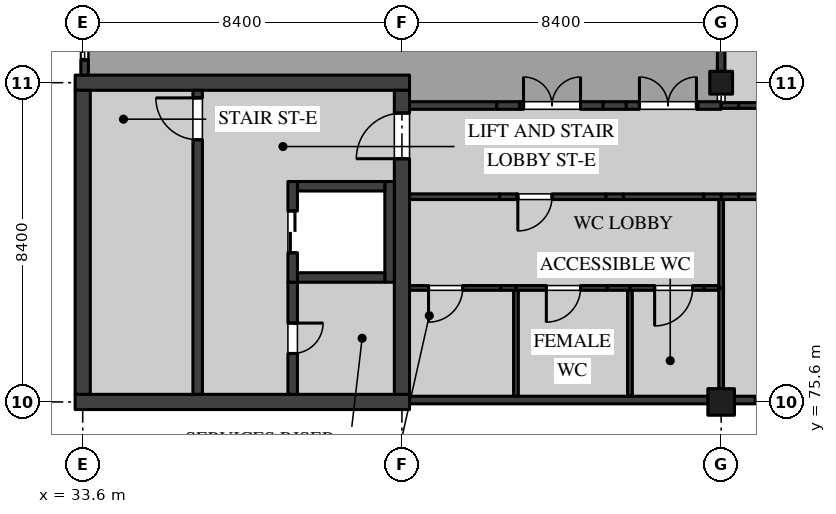
"""IFC4 building model, lengths in metres.
Left out: names, types, materials, properties, quantities, classifications, styles, units other than length and angle.
Written with IfcOpenShell. Run it as: python <this file> out.ifc"""

import sys

from ifc_helpers import new_model, si_unit, direction, frame, frame_2d, origin, origin_2d, place, context, subcontext, project, spatial, rectangle, extrude, element, fill, save


model = new_model("IFC4")
c1 = context("Model", 3, precision=1e-05, world=origin(), true_north=direction((0.0, 1.0)))
c2 = subcontext(c1, "Body", "Model", "MODEL_VIEW")
j1 = project(units=[si_unit("LENGTHUNIT", "METRE"), si_unit("PLANEANGLEUNIT", "RADIAN")], contexts=[c1])
p1 = place(None, origin())
s1 = spatial("IfcSite", under=j1, at=p1, CompositionType="ELEMENT")
p2 = place(p1, origin())
s2 = spatial("IfcBuilding", under=s1, at=p2, CompositionType="ELEMENT")
p3 = place(p2, frame((0.0, 0.0, 5.4)))
s3 = spatial("IfcBuildingStorey", under=s2, at=p3, CompositionType="ELEMENT", Elevation=5.4)
p4 = place(p3, frame((50.4, 75.6, 0.0), z_axis=(0.0, 0.0, 1.0), x_axis=(1.0, 0.0, 0.0)))
e1 = element("IfcColumn", 1, at=p4, inside=s3, PredefinedType="COLUMN", context=c2, shape_type="SweptSolid", body=[
    extrude(rectangle(XDim=0.7, YDim=0.7, at=origin_2d()), origin(), (0.0, 0.0, 1.0), 4.37),
])
p5 = place(p3, frame((50.4, 84.0, 0.0), z_axis=(0.0, 0.0, 1.0), x_axis=(1.0, 0.0, 0.0)))
e2 = element("IfcColumn", 2, at=p5, inside=s3, PredefinedType="COLUMN", context=c2, shape_type="SweptSolid", body=[
    extrude(rectangle(XDim=0.6, YDim=0.6, at=origin_2d()), origin(), (0.0, 0.0, 1.0), 4.37),
])
for number, where, z_axis, x_axis in (
    (3, (33.4, 75.6, 0.0), (0.0, 0.0, 1.0), (1.0, 0.0, 0.0)),
    (4, (33.4, 84.0, 0.0), (0.0, 0.0, 1.0), (1.0, 0.0, 0.0)),
):
    element("IfcWall", number, at=place(p3, frame(where, z_axis=z_axis, x_axis=x_axis)), inside=s3, PredefinedType="SHEAR", context=c2, shape_type="SweptSolid", body=[
        extrude(rectangle(XDim=8.8, YDim=0.4, at=frame_2d((4.4, 0.0))), origin(), (0.0, 0.0, 1.0), 4.37),
    ])
p6 = place(p3, frame((33.6, 75.8, 0.0), z_axis=(0.0, 0.0, 1.0), x_axis=(0.0, 1.0, 0.0)))
e5 = element("IfcWall", 5, at=p6, inside=s3, PredefinedType="SHEAR", context=c2, shape_type="SweptSolid", body=[
    extrude(rectangle(XDim=8.0, YDim=0.4, at=frame_2d((4.0, 0.0))), origin(), (0.0, 0.0, 1.0), 4.37),
])
p7 = place(p3, frame((42.0, 75.8, 0.0), z_axis=(0.0, 0.0, 1.0), x_axis=(0.0, 1.0, 0.0)))
e6 = element("IfcWall", 6, at=p7, inside=s3, PredefinedType="SHEAR", context=c2, shape_type="SweptSolid", body=[
    extrude(rectangle(XDim=8.0, YDim=0.4, at=frame_2d((4.0, 0.0))), origin(), (0.0, 0.0, 1.0), 4.37),
])
p8 = place(p7, frame((6.2, 0.0, 0.0)))
e7 = element("IfcOpeningElement", 7, at=p8, cuts=e6, PredefinedType="OPENING", context=c2, shape_type="SweptSolid", body=[
    extrude(rectangle(XDim=1.2, YDim=2.1, at=frame_2d((0.6, 1.05))), frame((0.0, 0.21, 0.0), z_axis=(0.0, -1.0, 0.0), x_axis=(1.0, 0.0, 0.0)), (0.0, 0.0, 1.0), 0.42),
])
p9 = place(p3, frame((36.625, 83.8, 0.0), z_axis=(0.0, 0.0, 1.0), x_axis=(0.0, -1.0, 0.0)))
e8 = element("IfcWall", 8, at=p9, inside=s3, PredefinedType="SOLIDWALL", context=c2, shape_type="SweptSolid", body=[
    extrude(rectangle(XDim=8.0, YDim=0.25, at=frame_2d((4.0, 0.0))), origin(), (0.0, 0.0, 1.0), 4.37),
])
p10 = place(p9, frame((0.2, 0.0, 0.0)))
e9 = element("IfcOpeningElement", 9, at=p10, cuts=e8, PredefinedType="OPENING", context=c2, shape_type="SweptSolid", body=[
    extrude(rectangle(XDim=1.1, YDim=2.1, at=frame_2d((0.55, 1.05))), frame((0.0, 0.135, 0.0), z_axis=(0.0, -1.0, 0.0), x_axis=(1.0, 0.0, 0.0)), (0.0, 0.0, 1.0), 0.27),
])
p11 = place(p3, frame((39.125, 78.75, 0.0), z_axis=(0.0, 0.0, 1.0), x_axis=(0.0, -1.0, 0.0)))
e10 = element("IfcWall", 10, at=p11, inside=s3, PredefinedType="SOLIDWALL", context=c2, shape_type="SweptSolid", body=[
    extrude(rectangle(XDim=2.95, YDim=0.25, at=frame_2d((1.475, 0.0))), origin(), (0.0, 0.0, 1.0), 4.37),
])
p12 = place(p11, frame((1.075, 0.0, 0.0)))
e11 = element("IfcOpeningElement", 11, at=p12, cuts=e10, PredefinedType="OPENING", context=c2, shape_type="SweptSolid", body=[
    extrude(rectangle(XDim=0.8, YDim=2.1, at=frame_2d((0.4, 1.05))), frame((0.0, 0.135, 0.0), z_axis=(0.0, -1.0, 0.0), x_axis=(1.0, 0.0, 0.0)), (0.0, 0.0, 1.0), 0.27),
])
p13 = place(p3, frame((41.675, 78.75, 0.0), z_axis=(0.0, 0.0, 1.0), x_axis=(0.0, 1.0, 0.0)))
e12 = element("IfcWall", 12, at=p13, inside=s3, PredefinedType="SOLIDWALL", context=c2, shape_type="SweptSolid", body=[
    extrude(rectangle(XDim=2.65, YDim=0.25, at=frame_2d((1.325, 0.0))), origin(), (0.0, 0.0, 1.0), 4.37),
])
for number, where, z_axis, x_axis in (
    (13, (39.25, 81.275, 0.0), (0.0, 0.0, 1.0), (1.0, 0.0, 0.0)),
    (14, (39.25, 78.875, 0.0), (0.0, 0.0, 1.0), (1.0, 0.0, 0.0)),
):
    element("IfcWall", number, at=place(p3, frame(where, z_axis=z_axis, x_axis=x_axis)), inside=s3, PredefinedType="SOLIDWALL", context=c2, shape_type="SweptSolid", body=[
        extrude(rectangle(XDim=2.3, YDim=0.25, at=frame_2d((1.15, 0.0))), origin(), (0.0, 0.0, 1.0), 4.37),
    ])
p14 = place(p3, frame((39.125, 78.75, 0.0), z_axis=(0.0, 0.0, 1.0), x_axis=(0.0, 1.0, 0.0)))
e15 = element("IfcWall", 15, at=p14, inside=s3, PredefinedType="SOLIDWALL", context=c2, shape_type="SweptSolid", body=[
    extrude(rectangle(XDim=2.65, YDim=0.25, at=frame_2d((1.325, 0.0))), origin(), (0.0, 0.0, 1.0), 4.37),
])
p15 = place(p14, frame((0.775, 0.0, 0.0)))
e16 = element("IfcOpeningElement", 16, at=p15, cuts=e15, PredefinedType="OPENING", context=c2, shape_type="SweptSolid", body=[
    extrude(rectangle(XDim=1.1, YDim=2.1, at=frame_2d((0.55, 1.05))), frame((0.0, 0.135, 0.0), z_axis=(0.0, -1.0, 0.0), x_axis=(1.0, 0.0, 0.0)), (0.0, 0.0, 1.0), 0.27),
])
p16 = place(p3, frame((42.2, 83.4, 0.0), z_axis=(0.0, 0.0, 1.0), x_axis=(1.0, 0.0, 0.0)))
e17 = element("IfcWall", 17, at=p16, inside=s3, PredefinedType="PARTITIONING", context=c2, shape_type="SweptSolid", body=[
    extrude(rectangle(XDim=2.295, YDim=0.2, at=frame_2d((1.147, 0.0))), origin(), (0.0, 0.0, 1.0), 4.37),
])
p17 = place(p3, frame((44.495, 83.4, 0.0), z_axis=(0.0, 0.0, 1.0), x_axis=(1.0, 0.0, 0.0)))
e18 = element("IfcWall", 18, at=p17, inside=s3, PredefinedType="PARTITIONING", context=c2, shape_type="SweptSolid", body=[
    extrude(rectangle(XDim=0.61, YDim=0.2, at=frame_2d((0.305, 0.0))), origin(), (0.0, 0.0, 1.0), 3.895),
])
p18 = place(p3, frame((45.105, 83.4, 0.0), z_axis=(0.0, 0.0, 1.0), x_axis=(1.0, 0.0, 0.0)))
e19 = element("IfcWall", 19, at=p18, inside=s3, PredefinedType="PARTITIONING", context=c2, shape_type="SweptSolid", body=[
    extrude(rectangle(XDim=2.19, YDim=0.2, at=frame_2d((1.095, 0.0))), origin(), (0.0, 0.0, 1.0), 4.37),
])
p19 = place(p18, frame((0.095, 0.0, 0.0)))
e20 = element("IfcOpeningElement", 20, at=p19, cuts=e19, PredefinedType="OPENING", context=c2, shape_type="SweptSolid", body=[
    extrude(rectangle(XDim=1.5, YDim=2.1, at=frame_2d((0.75, 1.05))), frame((0.0, 0.11, 0.0), z_axis=(0.0, -1.0, 0.0), x_axis=(1.0, 0.0, 0.0)), (0.0, 0.0, 1.0), 0.22),
])
p20 = place(p3, frame((47.295, 83.4, 0.0), z_axis=(0.0, 0.0, 1.0), x_axis=(1.0, 0.0, 0.0)))
e21 = element("IfcWall", 21, at=p20, inside=s3, PredefinedType="PARTITIONING", context=c2, shape_type="SweptSolid", body=[
    extrude(rectangle(XDim=0.61, YDim=0.2, at=frame_2d((0.305, 0.0))), origin(), (0.0, 0.0, 1.0), 3.895),
])
p21 = place(p3, frame((47.905, 83.4, 0.0), z_axis=(0.0, 0.0, 1.0), x_axis=(1.0, 0.0, 0.0)))
e22 = element("IfcWall", 22, at=p21, inside=s3, PredefinedType="PARTITIONING", context=c2, shape_type="SweptSolid", body=[
    extrude(rectangle(XDim=1.885, YDim=0.2, at=frame_2d((0.942, 0.0))), origin(), (0.0, 0.0, 1.0), 4.37),
])
p22 = place(p21, frame((0.345, 0.0, 0.0)))
e23 = element("IfcOpeningElement", 23, at=p22, cuts=e22, PredefinedType="OPENING", context=c2, shape_type="SweptSolid", body=[
    extrude(rectangle(XDim=1.5, YDim=2.1, at=frame_2d((0.75, 1.05))), frame((0.0, 0.11, 0.0), z_axis=(0.0, -1.0, 0.0), x_axis=(1.0, 0.0, 0.0)), (0.0, 0.0, 1.0), 0.22),
])
p23 = place(p3, frame((49.79, 83.4, 0.0), z_axis=(0.0, 0.0, 1.0), x_axis=(1.0, 0.0, 0.0)))
e24 = element("IfcWall", 24, at=p23, inside=s3, PredefinedType="PARTITIONING", context=c2, shape_type="SweptSolid", body=[
    extrude(rectangle(XDim=0.61, YDim=0.2, at=frame_2d((0.305, 0.0))), origin(), (0.0, 0.0, 1.0), 3.746),
])
p24 = place(p3, frame((50.4, 81.0, 0.0), z_axis=(0.0, 0.0, 1.0), x_axis=(1.0, 0.0, 0.0)))
e25 = element("IfcWall", 25, at=p24, inside=s3, PredefinedType="PARTITIONING", context=c2, shape_type="SweptSolid", body=[
    extrude(rectangle(XDim=0.46, YDim=0.15, at=frame_2d((0.23, 0.0))), origin(), (0.0, 0.0, 1.0), 3.746),
])
p25 = place(p3, frame((50.86, 81.0, 0.0), z_axis=(0.0, 0.0, 1.0), x_axis=(1.0, 0.0, 0.0)))
e26 = element("IfcWall", 26, at=p25, inside=s3, PredefinedType="PARTITIONING", context=c2, shape_type="SweptSolid", body=[
    extrude(rectangle(XDim=2.11, YDim=0.15, at=frame_2d((1.055, 0.0))), origin(), (0.0, 0.0, 1.0), 4.37),
])
p26 = place(p3, frame((50.4, 83.4, 0.0), z_axis=(0.0, 0.0, 1.0), x_axis=(1.0, 0.0, 0.0)))
e27 = element("IfcWall", 27, at=p26, inside=s3, PredefinedType="PARTITIONING", context=c2, shape_type="SweptSolid", body=[
    extrude(rectangle(XDim=0.46, YDim=0.15, at=frame_2d((0.23, 0.0))), origin(), (0.0, 0.0, 1.0), 3.746),
])
p27 = place(p3, frame((50.86, 83.4, 0.0), z_axis=(0.0, 0.0, 1.0), x_axis=(1.0, 0.0, 0.0)))
e28 = element("IfcWall", 28, at=p27, inside=s3, PredefinedType="PARTITIONING", context=c2, shape_type="SweptSolid", body=[
    extrude(rectangle(XDim=2.11, YDim=0.15, at=frame_2d((1.055, 0.0))), origin(), (0.0, 0.0, 1.0), 4.37),
])
p28 = place(p3, frame((42.2, 81.0, 0.0), z_axis=(0.0, 0.0, 1.0), x_axis=(1.0, 0.0, 0.0)))
e29 = element("IfcWall", 29, at=p28, inside=s3, PredefinedType="PARTITIONING", context=c2, shape_type="SweptSolid", body=[
    extrude(rectangle(XDim=2.37, YDim=0.15, at=frame_2d((1.185, 0.0))), origin(), (0.0, 0.0, 1.0), 4.37),
])
p29 = place(p3, frame((44.57, 81.0, 0.0), z_axis=(0.0, 0.0, 1.0), x_axis=(1.0, 0.0, 0.0)))
e30 = element("IfcWall", 30, at=p29, inside=s3, PredefinedType="PARTITIONING", context=c2, shape_type="SweptSolid", body=[
    extrude(rectangle(XDim=0.46, YDim=0.15, at=frame_2d((0.23, 0.0))), origin(), (0.0, 0.0, 1.0), 3.895),
])
p30 = place(p3, frame((45.03, 81.0, 0.0), z_axis=(0.0, 0.0, 1.0), x_axis=(1.0, 0.0, 0.0)))
e31 = element("IfcWall", 31, at=p30, inside=s3, PredefinedType="PARTITIONING", context=c2, shape_type="SweptSolid", body=[
    extrude(rectangle(XDim=2.34, YDim=0.15, at=frame_2d((1.17, 0.0))), origin(), (0.0, 0.0, 1.0), 4.37),
])
p31 = place(p30, frame((0.02, 0.0, 0.0)))
e32 = element("IfcOpeningElement", 32, at=p31, cuts=e31, PredefinedType="OPENING", context=c2, shape_type="SweptSolid", body=[
    extrude(rectangle(XDim=0.9, YDim=2.1, at=frame_2d((0.45, 1.05))), frame((0.0, 0.085, 0.0), z_axis=(0.0, -1.0, 0.0), x_axis=(1.0, 0.0, 0.0)), (0.0, 0.0, 1.0), 0.17),
])
p32 = place(p3, frame((47.37, 81.0, 0.0), z_axis=(0.0, 0.0, 1.0), x_axis=(1.0, 0.0, 0.0)))
e33 = element("IfcWall", 33, at=p32, inside=s3, PredefinedType="PARTITIONING", context=c2, shape_type="SweptSolid", body=[
    extrude(rectangle(XDim=0.46, YDim=0.15, at=frame_2d((0.23, 0.0))), origin(), (0.0, 0.0, 1.0), 3.895),
])
p33 = place(p3, frame((47.83, 81.0, 0.0), z_axis=(0.0, 0.0, 1.0), x_axis=(1.0, 0.0, 0.0)))
e34 = element("IfcWall", 34, at=p33, inside=s3, PredefinedType="PARTITIONING", context=c2, shape_type="SweptSolid", body=[
    extrude(rectangle(XDim=2.11, YDim=0.15, at=frame_2d((1.055, 0.0))), origin(), (0.0, 0.0, 1.0), 4.37),
])
p34 = place(p3, frame((49.94, 81.0, 0.0), z_axis=(0.0, 0.0, 1.0), x_axis=(1.0, 0.0, 0.0)))
e35 = element("IfcWall", 35, at=p34, inside=s3, PredefinedType="PARTITIONING", context=c2, shape_type="SweptSolid", body=[
    extrude(rectangle(XDim=0.46, YDim=0.15, at=frame_2d((0.23, 0.0))), origin(), (0.0, 0.0, 1.0), 3.746),
])
p35 = place(p3, frame((50.4, 84.3, 0.0), z_axis=(0.0, 0.0, 1.0), x_axis=(0.0, 1.0, 0.0)))
e36 = element("IfcWall", 36, at=p35, inside=s3, PredefinedType="PARTITIONING", context=c2, shape_type="SweptSolid", body=[
    extrude(rectangle(XDim=7.75, YDim=0.2, at=frame_2d((3.875, 0.0))), origin(), (0.0, 0.0, 1.0), 3.746),
])
p36 = place(p3, frame((50.4, 75.95, 0.0), z_axis=(0.0, 0.0, 1.0), x_axis=(0.0, 1.0, 0.0)))
e37 = element("IfcWall", 37, at=p36, inside=s3, PredefinedType="PARTITIONING", context=c2, shape_type="SweptSolid", body=[
    extrude(rectangle(XDim=2.65, YDim=0.125, at=frame_2d((1.325, 0.0))), origin(), (0.0, 0.0, 1.0), 3.746),
])
p37 = place(p3, frame((50.4, 78.6, 0.0), z_axis=(0.0, 0.0, 1.0), x_axis=(0.0, 1.0, 0.0)))
e38 = element("IfcWall", 38, at=p37, inside=s3, PredefinedType="PARTITIONING", context=c2, shape_type="SweptSolid", body=[
    extrude(rectangle(XDim=2.325, YDim=0.125, at=frame_2d((1.163, 0.0))), origin(), (0.0, 0.0, 1.0), 3.746),
])
p38 = place(p3, frame((48.0, 75.75, 0.0), z_axis=(0.0, 0.0, 1.0), x_axis=(0.0, 1.0, 0.0)))
e39 = element("IfcWall", 39, at=p38, inside=s3, PredefinedType="PARTITIONING", context=c2, shape_type="SweptSolid", body=[
    extrude(rectangle(XDim=2.787, YDim=0.125, at=frame_2d((1.394, 0.0))), origin(), (0.0, 0.0, 1.0), 4.37),
])
p39 = place(p3, frame((48.0, 78.6, 0.0), z_axis=(0.0, 0.0, 1.0), x_axis=(1.0, 0.0, 0.0)))
e40 = element("IfcWall", 40, at=p39, inside=s3, PredefinedType="PARTITIONING", context=c2, shape_type="SweptSolid", body=[
    extrude(rectangle(XDim=1.952, YDim=0.125, at=frame_2d((0.976, 0.0))), origin(), (0.0, 0.0, 1.0), 4.37),
])
p40 = place(p39, frame((0.65, 0.0, 0.0)))
e41 = element("IfcOpeningElement", 41, at=p40, cuts=e40, PredefinedType="OPENING", context=c2, shape_type="SweptSolid", body=[
    extrude(rectangle(XDim=1.0, YDim=2.1, at=frame_2d((0.5, 1.05))), frame((0.0, 0.073, 0.0), z_axis=(0.0, -1.0, 0.0), x_axis=(1.0, 0.0, 0.0)), (0.0, 0.0, 1.0), 0.145),
])
p41 = place(p3, frame((49.952, 78.6, 0.0), z_axis=(0.0, 0.0, 1.0), x_axis=(1.0, 0.0, 0.0)))
e42 = element("IfcWall", 42, at=p41, inside=s3, PredefinedType="PARTITIONING", context=c2, shape_type="SweptSolid", body=[
    extrude(rectangle(XDim=0.385, YDim=0.125, at=frame_2d((0.192, 0.0))), origin(), (0.0, 0.0, 1.0), 3.746),
])
p42 = place(p3, frame((45.0, 78.6, 0.0), z_axis=(0.0, 0.0, 1.0), x_axis=(1.0, 0.0, 0.0)))
e43 = element("IfcWall", 43, at=p42, inside=s3, PredefinedType="PARTITIONING", context=c2, shape_type="SweptSolid", body=[
    extrude(rectangle(XDim=2.407, YDim=0.125, at=frame_2d((1.204, 0.0))), origin(), (0.0, 0.0, 1.0), 4.37),
])
p43 = place(p42, frame((0.8, 0.0, 0.0)))
e44 = element("IfcOpeningElement", 44, at=p43, cuts=e43, PredefinedType="OPENING", context=c2, shape_type="SweptSolid", body=[
    extrude(rectangle(XDim=0.9, YDim=2.1, at=frame_2d((0.45, 1.05))), frame((0.0, 0.073, 0.0), z_axis=(0.0, -1.0, 0.0), x_axis=(1.0, 0.0, 0.0)), (0.0, 0.0, 1.0), 0.145),
])
p44 = place(p3, frame((47.407, 78.6, 0.0), z_axis=(0.0, 0.0, 1.0), x_axis=(1.0, 0.0, 0.0)))
e45 = element("IfcWall", 45, at=p44, inside=s3, PredefinedType="PARTITIONING", context=c2, shape_type="SweptSolid", body=[
    extrude(rectangle(XDim=0.593, YDim=0.125, at=frame_2d((0.296, 0.0))), origin(), (0.0, 0.0, 1.0), 3.895),
])
p45 = place(p3, frame((45.0, 75.75, 0.0), z_axis=(0.0, 0.0, 1.0), x_axis=(0.0, 1.0, 0.0)))
e46 = element("IfcWall", 46, at=p45, inside=s3, PredefinedType="PARTITIONING", context=c2, shape_type="SweptSolid", body=[
    extrude(rectangle(XDim=2.787, YDim=0.125, at=frame_2d((1.394, 0.0))), origin(), (0.0, 0.0, 1.0), 4.37),
])
p46 = place(p3, frame((42.2, 78.6, 0.0), z_axis=(0.0, 0.0, 1.0), x_axis=(1.0, 0.0, 0.0)))
e47 = element("IfcWall", 47, at=p46, inside=s3, PredefinedType="PARTITIONING", context=c2, shape_type="SweptSolid", body=[
    extrude(rectangle(XDim=2.407, YDim=0.125, at=frame_2d((1.204, 0.0))), origin(), (0.0, 0.0, 1.0), 4.37),
])
p47 = place(p46, frame((0.5, 0.0, 0.0)))
e48 = element("IfcOpeningElement", 48, at=p47, cuts=e47, PredefinedType="OPENING", context=c2, shape_type="SweptSolid", body=[
    extrude(rectangle(XDim=0.9, YDim=2.1, at=frame_2d((0.45, 1.05))), frame((0.0, 0.073, 0.0), z_axis=(0.0, -1.0, 0.0), x_axis=(1.0, 0.0, 0.0)), (0.0, 0.0, 1.0), 0.145),
])
p48 = place(p3, frame((44.607, 78.6, 0.0), z_axis=(0.0, 0.0, 1.0), x_axis=(1.0, 0.0, 0.0)))
e49 = element("IfcWall", 49, at=p48, inside=s3, PredefinedType="PARTITIONING", context=c2, shape_type="SweptSolid", body=[
    extrude(rectangle(XDim=0.393, YDim=0.125, at=frame_2d((0.197, 0.0))), origin(), (0.0, 0.0, 1.0), 3.895),
])
p49 = place(p3, frame((33.65, 92.07, 0.0), z_axis=(0.0, 0.0, 1.0), x_axis=(0.0, -1.0, 0.0)))
e50 = element("IfcWall", 50, at=p49, inside=s3, PredefinedType="SOLIDWALL", context=c2, shape_type="SweptSolid", body=[
    extrude(rectangle(XDim=7.87, YDim=0.2, at=frame_2d((3.935, 0.0))), origin(), (0.0, 0.0, 1.0), 3.746),
])
p50 = place(p49, frame((4.47, 0.0, 0.9)))
e51 = element("IfcOpeningElement", 51, at=p50, cuts=e50, PredefinedType="OPENING", context=c2, shape_type="SweptSolid", body=[
    extrude(rectangle(XDim=3.0, YDim=2.1, at=frame_2d((1.5, 1.05))), frame((0.0, 0.11, 0.0), z_axis=(0.0, -1.0, 0.0), x_axis=(1.0, 0.0, 0.0)), (0.0, 0.0, 1.0), 0.22),
])
p51 = place(p3, frame((42.2, 75.65, 0.0), z_axis=(0.0, 0.0, 1.0), x_axis=(1.0, 0.0, 0.0)))
e52 = element("IfcWall", 52, at=p51, inside=s3, PredefinedType="SOLIDWALL", context=c2, shape_type="SweptSolid", body=[
    extrude(rectangle(XDim=7.87, YDim=0.2, at=frame_2d((3.935, 0.0))), origin(), (0.0, 0.0, 1.0), 3.746),
])
p52 = place(p3, frame((50.73, 75.65, 0.0), z_axis=(0.0, 0.0, 1.0), x_axis=(1.0, 0.0, 0.0)))
e53 = element("IfcWall", 53, at=p52, inside=s3, PredefinedType="SOLIDWALL", context=c2, shape_type="SweptSolid", body=[
    extrude(rectangle(XDim=7.74, YDim=0.2, at=frame_2d((3.87, 0.0))), origin(), (0.0, 0.0, 1.0), 3.746),
])
p53 = place(p52, frame((0.57, 0.0, 0.9)))
e54 = element("IfcOpeningElement", 54, at=p53, cuts=e53, PredefinedType="OPENING", context=c2, shape_type="SweptSolid", body=[
    extrude(rectangle(XDim=2.4, YDim=2.1, at=frame_2d((1.2, 1.05))), frame((0.0, 0.11, 0.0), z_axis=(0.0, -1.0, 0.0), x_axis=(1.0, 0.0, 0.0)), (0.0, 0.0, 1.0), 0.22),
])
p54 = place(p8, origin())
e55 = element("IfcDoor", 55, at=p54, inside=s3, OperationType="SINGLE_SWING_RIGHT", PredefinedType="DOOR", context=c2, shape_type="SweptSolid", body=[
    extrude(rectangle(XDim=1.2, YDim=2.1, at=frame_2d((0.6, 1.05))), frame((0.0, 0.035, 0.0), z_axis=(0.0, -1.0, 0.0), x_axis=(1.0, 0.0, 0.0)), (0.0, 0.0, 1.0), 0.07),
])
fill(e7, e55)
p55 = place(p12, origin())
e56 = element("IfcDoor", 56, at=p55, inside=s3, OperationType="SINGLE_SWING_RIGHT", PredefinedType="DOOR", context=c2, shape_type="SweptSolid", body=[
    extrude(rectangle(XDim=0.8, YDim=2.1, at=frame_2d((0.4, 1.05))), frame((0.0, 0.035, 0.0), z_axis=(0.0, -1.0, 0.0), x_axis=(1.0, 0.0, 0.0)), (0.0, 0.0, 1.0), 0.07),
])
fill(e11, e56)
p56 = place(p10, frame((1.1, 0.0, 0.0), z_axis=(0.0, 0.0, 1.0), x_axis=(-1.0, 0.0, 0.0)))
e57 = element("IfcDoor", 57, at=p56, inside=s3, OperationType="SINGLE_SWING_LEFT", PredefinedType="DOOR", context=c2, shape_type="SweptSolid", body=[
    extrude(rectangle(XDim=1.1, YDim=2.1, at=frame_2d((0.55, 1.05))), frame((0.0, 0.035, 0.0), z_axis=(0.0, -1.0, 0.0), x_axis=(1.0, 0.0, 0.0)), (0.0, 0.0, 1.0), 0.07),
])
fill(e9, e57)
p57 = place(p15, origin())
e58 = element("IfcDoor", 58, at=p57, inside=s3, OperationType="DOUBLE_DOOR_SLIDING", PredefinedType="DOOR", context=c2, shape_type="SweptSolid", body=[
    extrude(rectangle(XDim=1.1, YDim=2.1, at=frame_2d((0.55, 1.05))), frame((0.0, 0.04, 0.0), z_axis=(0.0, -1.0, 0.0), x_axis=(1.0, 0.0, 0.0)), (0.0, 0.0, 1.0), 0.08),
])
fill(e16, e58)
p58 = place(p19, origin())
e59 = element("IfcDoor", 59, at=p58, inside=s3, OperationType="DOUBLE_DOOR_SINGLE_SWING", PredefinedType="DOOR", context=c2, shape_type="SweptSolid", body=[
    extrude(rectangle(XDim=1.5, YDim=2.1, at=frame_2d((0.75, 1.05))), frame((0.0, 0.03, 0.0), z_axis=(0.0, -1.0, 0.0), x_axis=(1.0, 0.0, 0.0)), (0.0, 0.0, 1.0), 0.06),
])
fill(e20, e59)
p59 = place(p22, origin())
e60 = element("IfcDoor", 60, at=p59, inside=s3, OperationType="DOUBLE_DOOR_SINGLE_SWING", PredefinedType="DOOR", context=c2, shape_type="SweptSolid", body=[
    extrude(rectangle(XDim=1.5, YDim=2.1, at=frame_2d((0.75, 1.05))), frame((0.0, 0.03, 0.0), z_axis=(0.0, -1.0, 0.0), x_axis=(1.0, 0.0, 0.0)), (0.0, 0.0, 1.0), 0.06),
])
fill(e23, e60)
p60 = place(p40, frame((1.0, 0.0, 0.0), z_axis=(0.0, 0.0, 1.0), x_axis=(-1.0, 0.0, 0.0)))
e61 = element("IfcDoor", 61, at=p60, inside=s3, OperationType="SINGLE_SWING_LEFT", PredefinedType="DOOR", context=c2, shape_type="SweptSolid", body=[
    extrude(rectangle(XDim=1.0, YDim=2.1, at=frame_2d((0.5, 1.05))), frame((0.0, 0.02, 0.0), z_axis=(0.0, -1.0, 0.0), x_axis=(1.0, 0.0, 0.0)), (0.0, 0.0, 1.0), 0.04),
])
fill(e41, e61)
p61 = place(p43, frame((0.9, 0.0, 0.0), z_axis=(0.0, 0.0, 1.0), x_axis=(-1.0, 0.0, 0.0)))
e62 = element("IfcDoor", 62, at=p61, inside=s3, OperationType="SINGLE_SWING_LEFT", PredefinedType="DOOR", context=c2, shape_type="SweptSolid", body=[
    extrude(rectangle(XDim=0.9, YDim=2.1, at=frame_2d((0.45, 1.05))), frame((0.0, 0.02, 0.0), z_axis=(0.0, -1.0, 0.0), x_axis=(1.0, 0.0, 0.0)), (0.0, 0.0, 1.0), 0.04),
])
fill(e44, e62)
p62 = place(p31, frame((0.9, 0.0, 0.0), z_axis=(0.0, 0.0, 1.0), x_axis=(-1.0, 0.0, 0.0)))
e63 = element("IfcDoor", 63, at=p62, inside=s3, OperationType="SINGLE_SWING_LEFT", PredefinedType="DOOR", context=c2, shape_type="SweptSolid", body=[
    extrude(rectangle(XDim=0.9, YDim=2.1, at=frame_2d((0.45, 1.05))), frame((0.0, 0.025, 0.0), z_axis=(0.0, -1.0, 0.0), x_axis=(1.0, 0.0, 0.0)), (0.0, 0.0, 1.0), 0.05),
])
fill(e32, e63)
p63 = place(p47, frame((0.9, 0.0, 0.0), z_axis=(0.0, 0.0, 1.0), x_axis=(-1.0, 0.0, 0.0)))
e64 = element("IfcDoor", 64, at=p63, inside=s3, OperationType="SINGLE_SWING_LEFT", PredefinedType="DOOR", context=c2, shape_type="SweptSolid", body=[
    extrude(rectangle(XDim=0.9, YDim=2.1, at=frame_2d((0.45, 1.05))), frame((0.0, 0.02, 0.0), z_axis=(0.0, -1.0, 0.0), x_axis=(1.0, 0.0, 0.0)), (0.0, 0.0, 1.0), 0.04),
])
fill(e48, e64)
p64 = place(p50, origin())
e65 = element("IfcWindow", 65, at=p64, inside=s3, PartitioningType="SINGLE_PANEL", PredefinedType="WINDOW", context=c2, shape_type="SweptSolid", body=[
    extrude(rectangle(XDim=3.0, YDim=2.1, at=frame_2d((1.5, 1.05))), frame((0.0, 0.04, 0.0), z_axis=(0.0, -1.0, 0.0), x_axis=(1.0, 0.0, 0.0)), (0.0, 0.0, 1.0), 0.08),
])
fill(e51, e65)
p65 = place(p53, origin())
e66 = element("IfcWindow", 66, at=p65, inside=s3, PartitioningType="SINGLE_PANEL", PredefinedType="WINDOW", context=c2, shape_type="SweptSolid", body=[
    extrude(rectangle(XDim=2.4, YDim=2.1, at=frame_2d((1.2, 1.05))), frame((0.0, 0.04, 0.0), z_axis=(0.0, -1.0, 0.0), x_axis=(1.0, 0.0, 0.0)), (0.0, 0.0, 1.0), 0.08),
])
fill(e54, e66)
save(model, sys.argv[1])
